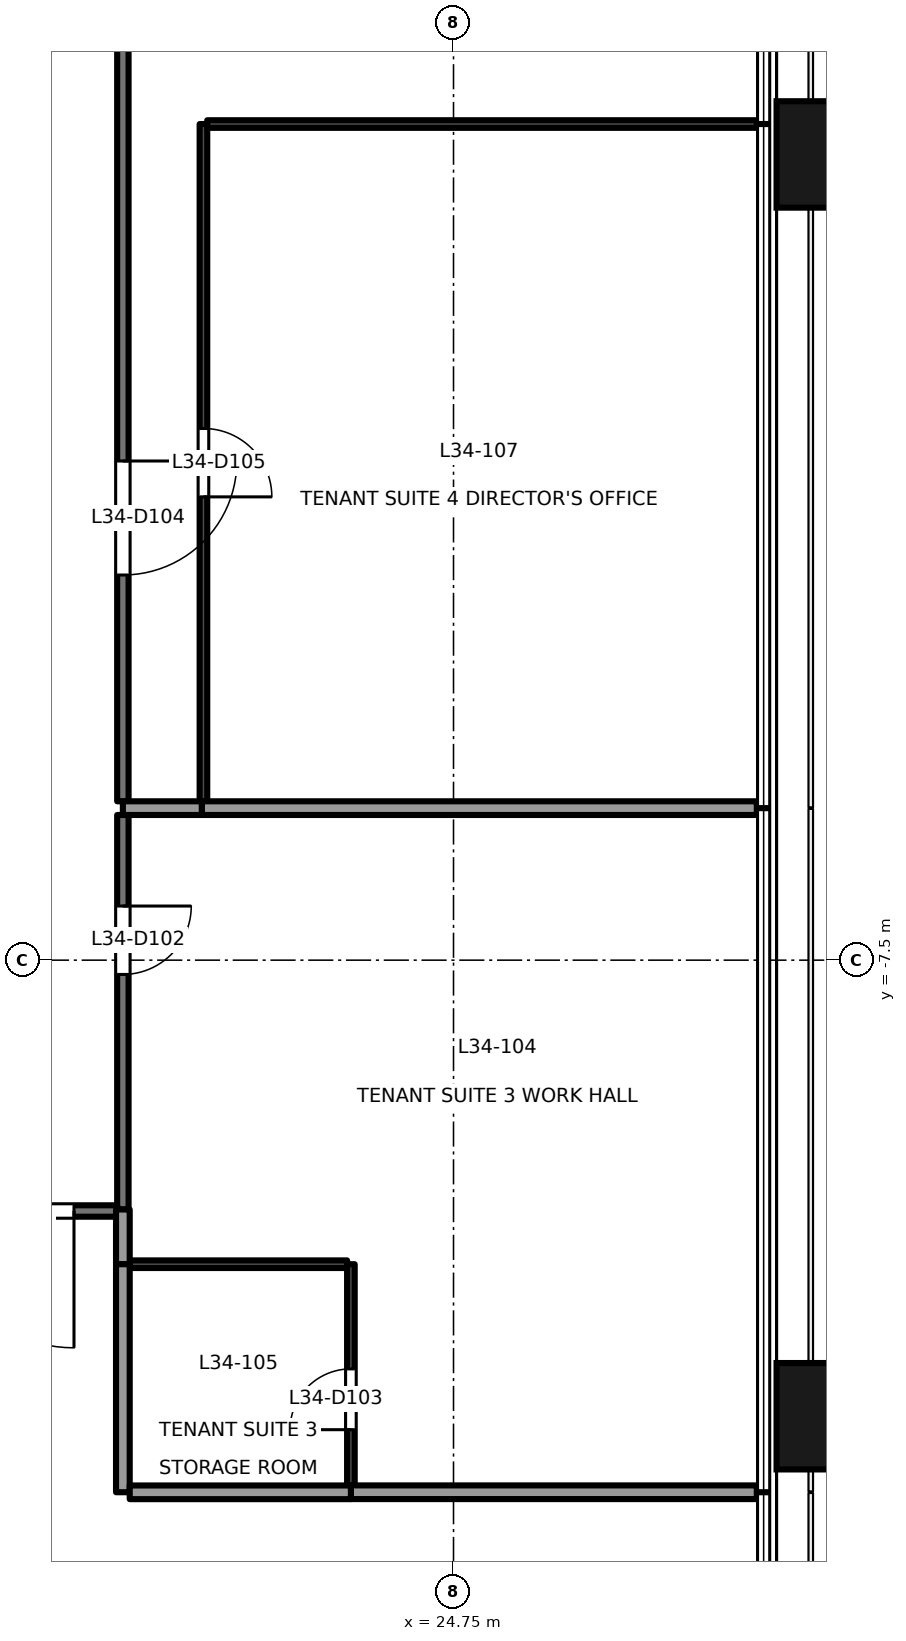
"""IFC4 building model, lengths in metres.
Left out: names, types, materials, properties, quantities, classifications, styles, units other than length and angle.
Written with IfcOpenShell. Run it as: python <this file> out.ifc"""

import sys

from ifc_helpers import new_model, si_unit, direction, frame, frame_2d, origin, origin_2d, place, context, subcontext, project, spatial, rectangle, extrude, element, fill, save


model = new_model("IFC4")
c1 = context("Model", 3, precision=1e-05, world=origin(), true_north=direction((0.0, 1.0)))
c2 = subcontext(c1, "Body", "Model", "MODEL_VIEW")
j1 = project(units=[si_unit("LENGTHUNIT", "METRE"), si_unit("PLANEANGLEUNIT", "RADIAN")], contexts=[c1])
p1 = place(None, origin())
s1 = spatial("IfcSite", under=j1, at=p1, CompositionType="ELEMENT")
p2 = place(p1, origin())
s2 = spatial("IfcBuilding", under=s1, at=p2, CompositionType="ELEMENT")
p3 = place(p2, frame((0.0, 0.0, 150.1)))
s3 = spatial("IfcBuildingStorey", under=s2, at=p3, CompositionType="ELEMENT", Elevation=150.1)
for number, where, z_axis, x_axis in (
    (1, (29.9, -13.5, -0.2), (0.0, 0.0, 1.0), (0.0, 1.0, 0.0)),
    (2, (29.9, 3.1, -0.2), (0.0, 0.0, 1.0), (0.0, 1.0, 0.0)),
):
    element("IfcColumn", number, at=place(p3, frame(where, z_axis=z_axis, x_axis=x_axis)), inside=s3, PredefinedType="COLUMN", context=c2, shape_type="SweptSolid", body=[
        extrude(rectangle(XDim=1.4, YDim=1.8, at=origin_2d()), origin(), (0.0, 0.0, 1.0), 4.0),
    ])
p4 = place(p3, frame((20.4, -5.59, 0.0), z_axis=(0.0, 0.0, 1.0), x_axis=(0.0, -1.0, 0.0)))
e3 = element("IfcWall", 3, at=p4, inside=s3, PredefinedType="PARTITIONING", context=c2, shape_type="SweptSolid", body=[
    extrude(rectangle(XDim=5.19, YDim=0.15, at=frame_2d((2.595, 0.0))), origin(), (0.0, 0.0, 1.0), 3.8),
])
p5 = place(p4, frame((1.198, 0.0, 0.0)))
e4 = element("IfcOpeningElement", 4, at=p5, cuts=e3, PredefinedType="OPENING", context=c2, shape_type="SweptSolid", body=[
    extrude(rectangle(XDim=0.9, YDim=2.1, at=frame_2d((0.45, 1.05))), frame((0.0, 0.085, 0.0), z_axis=(0.0, -1.0, 0.0), x_axis=(1.0, 0.0, 0.0)), (0.0, 0.0, 1.0), 0.171),
])
p6 = place(p3, frame((20.4, 7.5, 0.0), z_axis=(0.0, 0.0, 1.0), x_axis=(0.0, -1.0, 0.0)))
e5 = element("IfcWall", 5, at=p6, inside=s3, PredefinedType="PARTITIONING", context=c2, shape_type="SweptSolid", body=[
    extrude(rectangle(XDim=12.91, YDim=0.15, at=frame_2d((6.455, 0.0))), origin(), (0.0, 0.0, 1.0), 3.3),
])
p7 = place(p6, frame((8.433, 0.0, 0.0)))
e6 = element("IfcOpeningElement", 6, at=p7, cuts=e5, PredefinedType="OPENING", context=c2, shape_type="SweptSolid", body=[
    extrude(rectangle(XDim=1.5, YDim=2.1, at=frame_2d((0.75, 1.05))), frame((0.0, 0.085, 0.0), z_axis=(0.0, -1.0, 0.0), x_axis=(1.0, 0.0, 0.0)), (0.0, 0.0, 1.0), 0.171),
])
p8 = place(p3, frame((20.325, -10.8, 0.0), z_axis=(0.0, 0.0, 1.0), x_axis=(-1.0, 0.0, 0.0)))
e7 = element("IfcWall", 7, at=p8, inside=s3, PredefinedType="PARTITIONING", context=c2, shape_type="SweptSolid", body=[
    extrude(rectangle(XDim=3.572, YDim=0.15, at=frame_2d((1.786, 0.0))), origin(), (0.0, 0.0, 1.0), 3.8),
])
p9 = place(p8, frame((0.568, 0.0, 0.0)))
e8 = element("IfcOpeningElement", 8, at=p9, cuts=e7, PredefinedType="OPENING", context=c2, shape_type="SweptSolid", body=[
    extrude(rectangle(XDim=1.8, YDim=2.1, at=frame_2d((0.9, 1.05))), frame((0.0, 0.085, 0.0), z_axis=(0.0, -1.0, 0.0), x_axis=(1.0, 0.0, 0.0)), (0.0, 0.0, 1.0), 0.171),
])
p10 = place(p3, frame((23.35, -11.5, 0.0), z_axis=(0.0, 0.0, 1.0), x_axis=(-1.0, 0.0, 0.0)))
e9 = element("IfcWall", 9, at=p10, inside=s3, PredefinedType="PARTITIONING", context=c2, shape_type="SweptSolid", body=[
    extrude(rectangle(XDim=2.86, YDim=0.1, at=frame_2d((1.43, 0.0))), origin(), (0.0, 0.0, 1.0), 3.8),
])
p11 = place(p3, frame((23.4, -14.41, 0.0), z_axis=(0.0, 0.0, 1.0), x_axis=(0.0, 1.0, 0.0)))
e10 = element("IfcWall", 10, at=p11, inside=s3, PredefinedType="PARTITIONING", context=c2, shape_type="SweptSolid", body=[
    extrude(rectangle(XDim=2.91, YDim=0.1, at=frame_2d((1.455, 0.0))), origin(), (0.0, 0.0, 1.0), 3.8),
])
p12 = place(p11, frame((0.733, 0.0, 0.0)))
e11 = element("IfcOpeningElement", 11, at=p12, cuts=e10, PredefinedType="OPENING", context=c2, shape_type="SweptSolid", body=[
    extrude(rectangle(XDim=0.8, YDim=2.1, at=frame_2d((0.4, 1.05))), frame((0.0, 0.061, 0.0), z_axis=(0.0, -1.0, 0.0), x_axis=(1.0, 0.0, 0.0)), (0.0, 0.0, 1.0), 0.121),
])
p13 = place(p3, frame((20.4, -5.5, 0.0), z_axis=(0.0, 0.0, 1.0), x_axis=(1.0, 0.0, 0.0)))
e12 = element("IfcWall", 12, at=p13, inside=s3, PredefinedType="PARTITIONING", context=c2, shape_type="SweptSolid", body=[
    extrude(rectangle(XDim=1.04, YDim=0.18, at=frame_2d((0.52, 0.0))), origin(), (0.0, 0.0, 1.0), 3.8),
])
p14 = place(p3, frame((21.44, -5.5, 0.0), z_axis=(0.0, 0.0, 1.0), x_axis=(1.0, 0.0, 0.0)))
e13 = element("IfcWall", 13, at=p14, inside=s3, PredefinedType="PARTITIONING", context=c2, shape_type="SweptSolid", body=[
    extrude(rectangle(XDim=7.3, YDim=0.18, at=frame_2d((3.65, 0.0))), origin(), (0.0, 0.0, 1.0), 3.8),
])
p15 = place(p3, frame((20.4, -11.5, 0.0), z_axis=(0.0, 0.0, 1.0), x_axis=(0.0, 1.0, 0.0)))
e14 = element("IfcWall", 14, at=p15, inside=s3, PredefinedType="PARTITIONING", context=c2, shape_type="SweptSolid", body=[
    extrude(rectangle(XDim=0.72, YDim=0.18, at=frame_2d((0.36, 0.0))), origin(), (0.0, 0.0, 1.0), 3.8),
])
p16 = place(p3, frame((28.74, -14.5, 0.0), z_axis=(0.0, 0.0, 1.0), x_axis=(-1.0, 0.0, 0.0)))
e15 = element("IfcWall", 15, at=p16, inside=s3, PredefinedType="PARTITIONING", context=c2, shape_type="SweptSolid", body=[
    extrude(rectangle(XDim=5.34, YDim=0.18, at=frame_2d((2.67, 0.0))), origin(), (0.0, 0.0, 1.0), 3.8),
])
p17 = place(p3, frame((20.4, -14.5, 0.0), z_axis=(0.0, 0.0, 1.0), x_axis=(0.0, 1.0, 0.0)))
e16 = element("IfcWall", 16, at=p17, inside=s3, PredefinedType="PARTITIONING", context=c2, shape_type="SweptSolid", body=[
    extrude(rectangle(XDim=3.0, YDim=0.18, at=frame_2d((1.5, 0.0))), origin(), (0.0, 0.0, 1.0), 3.8),
])
p18 = place(p3, frame((23.4, -14.501, 0.0), z_axis=(0.0, 0.0, 1.0), x_axis=(-1.0, 0.0, 0.0)))
e17 = element("IfcWall", 17, at=p18, inside=s3, PredefinedType="PARTITIONING", context=c2, shape_type="SweptSolid", body=[
    extrude(rectangle(XDim=2.91, YDim=0.18, at=frame_2d((1.455, 0.0))), origin(), (0.0, 0.0, 1.0), 3.8),
])
p19 = place(p3, frame((21.46, 3.5, 0.0), z_axis=(0.0, 0.0, 1.0), x_axis=(0.0, -1.0, 0.0)))
e18 = element("IfcWall", 18, at=p19, inside=s3, PredefinedType="PARTITIONING", context=c2, shape_type="SweptSolid", body=[
    extrude(rectangle(XDim=8.91, YDim=0.1, at=frame_2d((4.455, 0.0))), origin(), (0.0, 0.0, 1.0), 3.3),
])
p20 = place(p19, frame((4.005, 0.0, 0.0)))
e19 = element("IfcOpeningElement", 19, at=p20, cuts=e18, PredefinedType="OPENING", context=c2, shape_type="SweptSolid", body=[
    extrude(rectangle(XDim=0.9, YDim=2.1, at=frame_2d((0.45, 1.05))), frame((0.0, 0.061, 0.0), z_axis=(0.0, -1.0, 0.0), x_axis=(1.0, 0.0, 0.0)), (0.0, 0.0, 1.0), 0.121),
])
p21 = place(p3, frame((28.74, 3.5, 0.0), z_axis=(0.0, 0.0, 1.0), x_axis=(-1.0, 0.0, 0.0)))
e20 = element("IfcWall", 20, at=p21, inside=s3, PredefinedType="PARTITIONING", context=c2, shape_type="SweptSolid", body=[
    extrude(rectangle(XDim=7.23, YDim=0.1, at=frame_2d((3.615, 0.0))), origin(), (0.0, 0.0, 1.0), 3.8),
])
p22 = place(p5, origin())
e21 = element("IfcDoor", 21, at=p22, inside=s3, OperationType="SINGLE_SWING_LEFT", PredefinedType="DOOR", context=c2, shape_type="SweptSolid", body=[
    extrude(rectangle(XDim=0.9, YDim=2.1, at=frame_2d((0.45, 1.05))), frame((0.0, 0.025, 0.0), z_axis=(0.0, -1.0, 0.0), x_axis=(1.0, 0.0, 0.0)), (0.0, 0.0, 1.0), 0.05),
])
fill(e4, e21)
p23 = place(p12, origin())
e22 = element("IfcDoor", 22, at=p23, inside=s3, OperationType="SINGLE_SWING_LEFT", PredefinedType="DOOR", context=c2, shape_type="SweptSolid", body=[
    extrude(rectangle(XDim=0.8, YDim=2.1, at=frame_2d((0.4, 1.05))), frame((0.0, 0.025, 0.0), z_axis=(0.0, -1.0, 0.0), x_axis=(1.0, 0.0, 0.0)), (0.0, 0.0, 1.0), 0.05),
])
fill(e11, e22)
p24 = place(p7, origin())
e23 = element("IfcDoor", 23, at=p24, inside=s3, OperationType="DOUBLE_DOOR_SINGLE_SWING", PredefinedType="DOOR", context=c2, shape_type="SweptSolid", body=[
    extrude(rectangle(XDim=1.5, YDim=2.1, at=frame_2d((0.75, 1.05))), frame((0.0, 0.025, 0.0), z_axis=(0.0, -1.0, 0.0), x_axis=(1.0, 0.0, 0.0)), (0.0, 0.0, 1.0), 0.05),
])
fill(e6, e23)
p25 = place(p20, origin())
e24 = element("IfcDoor", 24, at=p25, inside=s3, OperationType="SINGLE_SWING_RIGHT", PredefinedType="DOOR", context=c2, shape_type="SweptSolid", body=[
    extrude(rectangle(XDim=0.9, YDim=2.1, at=frame_2d((0.45, 1.05))), frame((0.0, 0.025, 0.0), z_axis=(0.0, -1.0, 0.0), x_axis=(1.0, 0.0, 0.0)), (0.0, 0.0, 1.0), 0.05),
])
fill(e19, e24)
p26 = place(p9, origin())
e25 = element("IfcDoor", 25, at=p26, inside=s3, OperationType="DOUBLE_DOOR_SINGLE_SWING", PredefinedType="DOOR", context=c2, shape_type="SweptSolid", body=[
    extrude(rectangle(XDim=1.8, YDim=2.1, at=frame_2d((0.9, 1.05))), frame((0.0, 0.025, 0.0), z_axis=(0.0, -1.0, 0.0), x_axis=(1.0, 0.0, 0.0)), (0.0, 0.0, 1.0), 0.05),
])
fill(e8, e25)
save(model, sys.argv[1])
